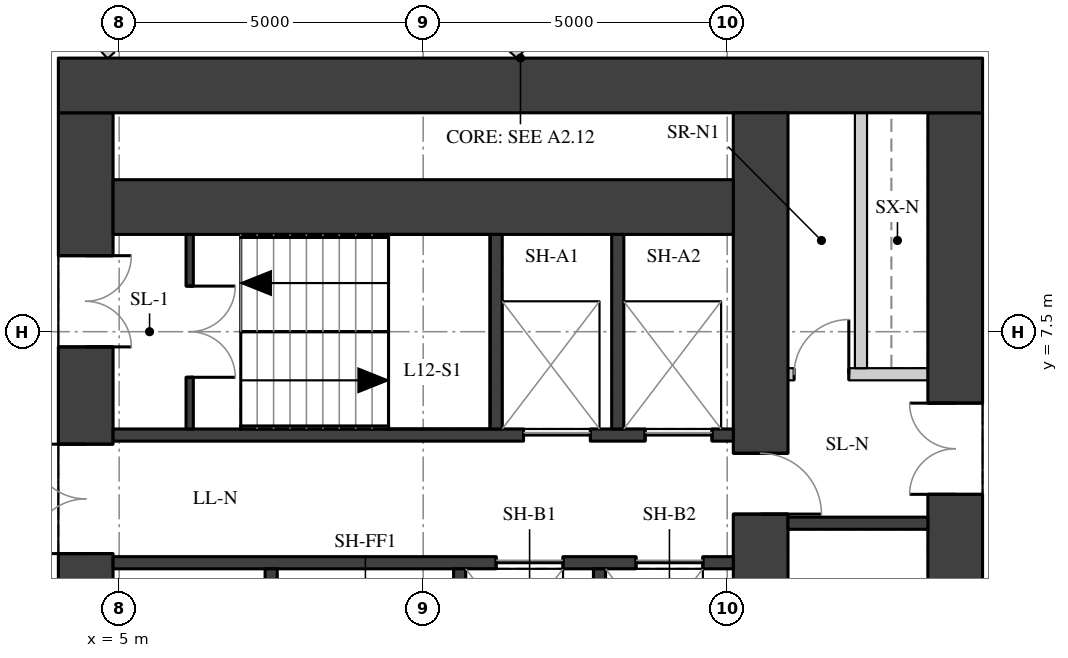
"""IFC4 building model, lengths in metres.
Left out: names, types, materials, properties, quantities, classifications, styles, units other than length and angle.
Written with IfcOpenShell. Run it as: python <this file> out.ifc"""

import sys

from ifc_helpers import new_model, si_unit, direction, frame, frame_2d, origin, place, context, subcontext, project, spatial, rectangle, extrude, element, fill, save


model = new_model("IFC4")
c1 = context("Model", 3, precision=1e-05, world=origin(), true_north=direction((0.0, 1.0)))
c2 = subcontext(c1, "Body", "Model", "MODEL_VIEW")
j1 = project(units=[si_unit("LENGTHUNIT", "METRE"), si_unit("PLANEANGLEUNIT", "RADIAN")], contexts=[c1])
p1 = place(None, origin())
s1 = spatial("IfcSite", under=j1, at=p1, CompositionType="ELEMENT")
p2 = place(p1, origin())
s2 = spatial("IfcBuilding", under=s1, at=p2, CompositionType="ELEMENT")
p3 = place(p2, frame((0.0, 0.0, 48.1)))
s3 = spatial("IfcBuildingStorey", under=s2, at=p3, CompositionType="ELEMENT", Elevation=48.1)
p4 = place(p3, frame((4.45, -11.1, 0.0), z_axis=(0.0, 0.0, 1.0), x_axis=(0.0, 1.0, 0.0)))
e1 = element("IfcWall", 1, at=p4, inside=s3, PredefinedType="SHEAR", context=c2, shape_type="SweptSolid", body=[
    extrude(rectangle(XDim=22.2, YDim=0.9, at=frame_2d((11.1, 0.0))), origin(), (0.0, 0.0, 1.0), 3.02),
])
p5 = place(p4, frame((2.35, 0.0, 0.0)))
e2 = element("IfcOpeningElement", 2, at=p5, cuts=e1, PredefinedType="OPENING", context=c2, shape_type="SweptSolid", body=[
    extrude(rectangle(XDim=1.5, YDim=2.1, at=frame_2d((0.75, 1.05))), frame((0.0, 0.46, 0.0), z_axis=(0.0, -1.0, 0.0), x_axis=(1.0, 0.0, 0.0)), (0.0, 0.0, 1.0), 0.92),
])
p6 = place(p4, frame((5.45, 0.0, 0.0)))
e3 = element("IfcOpeningElement", 3, at=p6, cuts=e1, PredefinedType="OPENING", context=c2, shape_type="SweptSolid", body=[
    extrude(rectangle(XDim=1.8, YDim=2.1, at=frame_2d((0.9, 1.05))), frame((0.0, 0.46, 0.0), z_axis=(0.0, -1.0, 0.0), x_axis=(1.0, 0.0, 0.0)), (0.0, 0.0, 1.0), 0.92),
])
p7 = place(p4, frame((7.95, 0.0, 0.0)))
e4 = element("IfcOpeningElement", 4, at=p7, cuts=e1, PredefinedType="OPENING", context=c2, shape_type="SweptSolid", body=[
    extrude(rectangle(XDim=1.1, YDim=2.1, at=frame_2d((0.55, 1.05))), frame((0.0, 0.46, 0.0), z_axis=(0.0, -1.0, 0.0), x_axis=(1.0, 0.0, 0.0)), (0.0, 0.0, 1.0), 0.92),
])
p8 = place(p4, frame((10.6, 0.0, 0.0)))
e5 = element("IfcOpeningElement", 5, at=p8, cuts=e1, PredefinedType="OPENING", context=c2, shape_type="SweptSolid", body=[
    extrude(rectangle(XDim=1.0, YDim=2.1, at=frame_2d((0.5, 1.05))), frame((0.0, 0.46, 0.0), z_axis=(0.0, -1.0, 0.0), x_axis=(1.0, 0.0, 0.0)), (0.0, 0.0, 1.0), 0.92),
])
p9 = place(p4, frame((13.15, 0.0, 0.0)))
e6 = element("IfcOpeningElement", 6, at=p9, cuts=e1, PredefinedType="OPENING", context=c2, shape_type="SweptSolid", body=[
    extrude(rectangle(XDim=1.1, YDim=2.1, at=frame_2d((0.55, 1.05))), frame((0.0, 0.46, 0.0), z_axis=(0.0, -1.0, 0.0), x_axis=(1.0, 0.0, 0.0)), (0.0, 0.0, 1.0), 0.92),
])
p10 = place(p4, frame((14.95, 0.0, 0.0)))
e7 = element("IfcOpeningElement", 7, at=p10, cuts=e1, PredefinedType="OPENING", context=c2, shape_type="SweptSolid", body=[
    extrude(rectangle(XDim=1.8, YDim=2.1, at=frame_2d((0.9, 1.05))), frame((0.0, 0.46, 0.0), z_axis=(0.0, -1.0, 0.0), x_axis=(1.0, 0.0, 0.0)), (0.0, 0.0, 1.0), 0.92),
])
p11 = place(p4, frame((18.35, 0.0, 0.0)))
e8 = element("IfcOpeningElement", 8, at=p11, cuts=e1, PredefinedType="OPENING", context=c2, shape_type="SweptSolid", body=[
    extrude(rectangle(XDim=1.5, YDim=2.1, at=frame_2d((0.75, 1.05))), frame((0.0, 0.46, 0.0), z_axis=(0.0, -1.0, 0.0), x_axis=(1.0, 0.0, 0.0)), (0.0, 0.0, 1.0), 0.92),
])
p12 = place(p3, frame((18.75, -11.1, 0.0), z_axis=(0.0, 0.0, 1.0), x_axis=(0.0, 1.0, 0.0)))
e9 = element("IfcWall", 9, at=p12, inside=s3, PredefinedType="SHEAR", context=c2, shape_type="SweptSolid", body=[
    extrude(rectangle(XDim=22.2, YDim=0.9, at=frame_2d((11.1, 0.0))), origin(), (0.0, 0.0, 1.0), 3.02),
])
p13 = place(p12, frame((15.925, 0.0, 0.0)))
e10 = element("IfcOpeningElement", 10, at=p13, cuts=e9, PredefinedType="OPENING", context=c2, shape_type="SweptSolid", body=[
    extrude(rectangle(XDim=1.5, YDim=2.1, at=frame_2d((0.75, 1.05))), frame((0.0, 0.46, 0.0), z_axis=(0.0, -1.0, 0.0), x_axis=(1.0, 0.0, 0.0)), (0.0, 0.0, 1.0), 0.92),
])
p14 = place(p12, frame((4.525, 0.0, 0.0)))
e11 = element("IfcOpeningElement", 11, at=p14, cuts=e9, PredefinedType="OPENING", context=c2, shape_type="SweptSolid", body=[
    extrude(rectangle(XDim=1.5, YDim=2.1, at=frame_2d((0.75, 1.05))), frame((0.0, 0.46, 0.0), z_axis=(0.0, -1.0, 0.0), x_axis=(1.0, 0.0, 0.0)), (0.0, 0.0, 1.0), 0.92),
])
p15 = place(p3, frame((4.0, 11.55, 0.0), z_axis=(0.0, 0.0, 1.0), x_axis=(1.0, 0.0, 0.0)))
e12 = element("IfcWall", 12, at=p15, inside=s3, PredefinedType="SHEAR", context=c2, shape_type="SweptSolid", body=[
    extrude(rectangle(XDim=15.2, YDim=0.9, at=frame_2d((7.6, 0.0))), origin(), (0.0, 0.0, 1.0), 3.02),
])
p16 = place(p3, frame((15.55, -11.1, 0.0), z_axis=(0.0, 0.0, 1.0), x_axis=(0.0, 1.0, 0.0)))
e13 = element("IfcWall", 13, at=p16, inside=s3, PredefinedType="SHEAR", context=c2, shape_type="SweptSolid", body=[
    extrude(rectangle(XDim=22.2, YDim=0.9, at=frame_2d((11.1, 0.0))), origin(), (0.0, 0.0, 1.0), 3.02),
])
p17 = place(p16, frame((15.6, 0.0, 0.0)))
e14 = element("IfcOpeningElement", 14, at=p17, cuts=e13, PredefinedType="OPENING", context=c2, shape_type="SweptSolid", body=[
    extrude(rectangle(XDim=1.0, YDim=2.1, at=frame_2d((0.5, 1.05))), frame((0.0, 0.46, 0.0), z_axis=(0.0, -1.0, 0.0), x_axis=(1.0, 0.0, 0.0)), (0.0, 0.0, 1.0), 0.92),
])
p18 = place(p16, frame((5.6, 0.0, 0.0)))
e15 = element("IfcOpeningElement", 15, at=p18, cuts=e13, PredefinedType="OPENING", context=c2, shape_type="SweptSolid", body=[
    extrude(rectangle(XDim=1.0, YDim=2.1, at=frame_2d((0.5, 1.05))), frame((0.0, 0.46, 0.0), z_axis=(0.0, -1.0, 0.0), x_axis=(1.0, 0.0, 0.0)), (0.0, 0.0, 1.0), 0.92),
])
p19 = place(p3, frame((4.9, 9.55, 0.0), z_axis=(0.0, 0.0, 1.0), x_axis=(1.0, 0.0, 0.0)))
e16 = element("IfcWall", 16, at=p19, inside=s3, PredefinedType="SHEAR", context=c2, shape_type="SweptSolid", body=[
    extrude(rectangle(XDim=10.2, YDim=0.9, at=frame_2d((5.1, 0.0))), origin(), (0.0, 0.0, 1.0), 3.02),
])
p20 = place(p3, frame((4.9, 5.8, 0.0), z_axis=(0.0, 0.0, 1.0), x_axis=(1.0, 0.0, 0.0)))
e17 = element("IfcWall", 17, at=p20, inside=s3, PredefinedType="SHEAR", context=c2, shape_type="SweptSolid", body=[
    extrude(rectangle(XDim=10.2, YDim=0.2, at=frame_2d((5.1, 0.0))), origin(), (0.0, 0.0, 1.0), 3.02),
])
p21 = place(p20, frame((6.75, 0.0, 0.0)))
e18 = element("IfcOpeningElement", 18, at=p21, cuts=e17, PredefinedType="OPENING", context=c2, shape_type="SweptSolid", body=[
    extrude(rectangle(XDim=1.1, YDim=2.1, at=frame_2d((0.55, 1.05))), frame((0.0, 0.11, 0.0), z_axis=(0.0, -1.0, 0.0), x_axis=(1.0, 0.0, 0.0)), (0.0, 0.0, 1.0), 0.22),
])
p22 = place(p20, frame((8.75, 0.0, 0.0)))
e19 = element("IfcOpeningElement", 19, at=p22, cuts=e17, PredefinedType="OPENING", context=c2, shape_type="SweptSolid", body=[
    extrude(rectangle(XDim=1.1, YDim=2.1, at=frame_2d((0.55, 1.05))), frame((0.0, 0.11, 0.0), z_axis=(0.0, -1.0, 0.0), x_axis=(1.0, 0.0, 0.0)), (0.0, 0.0, 1.0), 0.22),
])
p23 = place(p3, frame((4.9, 3.7, 0.0), z_axis=(0.0, 0.0, 1.0), x_axis=(1.0, 0.0, 0.0)))
e20 = element("IfcWall", 20, at=p23, inside=s3, PredefinedType="SHEAR", context=c2, shape_type="SweptSolid", body=[
    extrude(rectangle(XDim=10.2, YDim=0.2, at=frame_2d((5.1, 0.0))), origin(), (0.0, 0.0, 1.0), 3.02),
])
p24 = place(p23, frame((6.3, 0.0, 0.0)))
e21 = element("IfcOpeningElement", 21, at=p24, cuts=e20, PredefinedType="OPENING", context=c2, shape_type="SweptSolid", body=[
    extrude(rectangle(XDim=1.1, YDim=2.1, at=frame_2d((0.55, 1.05))), frame((0.0, 0.11, 0.0), z_axis=(0.0, -1.0, 0.0), x_axis=(1.0, 0.0, 0.0)), (0.0, 0.0, 1.0), 0.22),
])
p25 = place(p23, frame((8.6, 0.0, 0.0)))
e22 = element("IfcOpeningElement", 22, at=p25, cuts=e20, PredefinedType="OPENING", context=c2, shape_type="SweptSolid", body=[
    extrude(rectangle(XDim=1.1, YDim=2.1, at=frame_2d((0.55, 1.05))), frame((0.0, 0.11, 0.0), z_axis=(0.0, -1.0, 0.0), x_axis=(1.0, 0.0, 0.0)), (0.0, 0.0, 1.0), 0.22),
])
for number, where, z_axis, x_axis in (
    (23, (11.2, 5.9, 0.0), (0.0, 0.0, 1.0), (0.0, 1.0, 0.0)),
    (24, (13.2, 5.9, 0.0), (0.0, 0.0, 1.0), (0.0, 1.0, 0.0)),
):
    element("IfcWall", number, at=place(p3, frame(where, z_axis=z_axis, x_axis=x_axis)), inside=s3, PredefinedType="SHEAR", context=c2, shape_type="SweptSolid", body=[
        extrude(rectangle(XDim=3.2, YDim=0.2, at=frame_2d((1.6, 0.0))), origin(), (0.0, 0.0, 1.0), 3.02),
    ])
p26 = place(p3, frame((7.5, 1.1, 0.0), z_axis=(0.0, 0.0, 1.0), x_axis=(0.0, 1.0, 0.0)))
e25 = element("IfcWall", 25, at=p26, inside=s3, PredefinedType="SHEAR", context=c2, shape_type="SweptSolid", body=[
    extrude(rectangle(XDim=2.5, YDim=0.2, at=frame_2d((1.25, 0.0))), origin(), (0.0, 0.0, 1.0), 3.02),
])
p27 = place(p26, frame((0.7, 0.0, 0.0)))
e26 = element("IfcOpeningElement", 26, at=p27, cuts=e25, PredefinedType="OPENING", context=c2, shape_type="SweptSolid", body=[
    extrude(rectangle(XDim=1.1, YDim=2.1, at=frame_2d((0.55, 1.05))), frame((0.0, 0.11, 0.0), z_axis=(0.0, -1.0, 0.0), x_axis=(1.0, 0.0, 0.0)), (0.0, 0.0, 1.0), 0.22),
])
for number, where, z_axis, x_axis in (
    (27, (10.6, 1.1, 0.0), (0.0, 0.0, 1.0), (0.0, 1.0, 0.0)),
    (28, (12.9, 1.1, 0.0), (0.0, 0.0, 1.0), (0.0, 1.0, 0.0)),
):
    element("IfcWall", number, at=place(p3, frame(where, z_axis=z_axis, x_axis=x_axis)), inside=s3, PredefinedType="SHEAR", context=c2, shape_type="SweptSolid", body=[
        extrude(rectangle(XDim=2.5, YDim=0.2, at=frame_2d((1.25, 0.0))), origin(), (0.0, 0.0, 1.0), 3.02),
    ])
p28 = place(p3, frame((6.16, 5.9, 0.0), z_axis=(0.0, 0.0, 1.0), x_axis=(0.0, 1.0, 0.0)))
e29 = element("IfcWall", 29, at=p28, inside=s3, PredefinedType="SHEAR", context=c2, shape_type="SweptSolid", body=[
    extrude(rectangle(XDim=3.2, YDim=0.12, at=frame_2d((1.6, 0.0))), origin(), (0.0, 0.0, 1.0), 3.02),
])
p29 = place(p28, frame((0.85, 0.0, 0.0)))
e30 = element("IfcOpeningElement", 30, at=p29, cuts=e29, PredefinedType="OPENING", context=c2, shape_type="SweptSolid", body=[
    extrude(rectangle(XDim=1.5, YDim=2.1, at=frame_2d((0.75, 1.05))), frame((0.0, 0.07, 0.0), z_axis=(0.0, -1.0, 0.0), x_axis=(1.0, 0.0, 0.0)), (0.0, 0.0, 1.0), 0.14),
])
p30 = place(p3, frame((16.0, 4.35, 0.0), z_axis=(0.0, 0.0, 1.0), x_axis=(1.0, 0.0, 0.0)))
e31 = element("IfcWall", 31, at=p30, inside=s3, PredefinedType="SHEAR", context=c2, shape_type="SweptSolid", body=[
    extrude(rectangle(XDim=2.3, YDim=0.2, at=frame_2d((1.15, 0.0))), origin(), (0.0, 0.0, 1.0), 3.02),
])
p31 = place(p3, frame((16.0, 6.8, 0.0), z_axis=(0.0, 0.0, 1.0), x_axis=(1.0, 0.0, 0.0)))
e32 = element("IfcWall", 32, at=p31, inside=s3, PredefinedType="PARTITIONING", context=c2, shape_type="SweptSolid", body=[
    extrude(rectangle(XDim=2.3, YDim=0.2, at=frame_2d((1.15, 0.0))), origin(), (0.0, 0.0, 1.0), 3.02),
])
p32 = place(p31, frame((0.1, 0.0, 0.0)))
e33 = element("IfcOpeningElement", 33, at=p32, cuts=e32, PredefinedType="OPENING", context=c2, shape_type="SweptSolid", body=[
    extrude(rectangle(XDim=0.9, YDim=2.1, at=frame_2d((0.45, 1.05))), frame((0.0, 0.11, 0.0), z_axis=(0.0, -1.0, 0.0), x_axis=(1.0, 0.0, 0.0)), (0.0, 0.0, 1.0), 0.22),
])
p33 = place(p3, frame((17.2, 6.9, 0.0), z_axis=(0.0, 0.0, 1.0), x_axis=(0.0, 1.0, 0.0)))
e34 = element("IfcWall", 34, at=p33, inside=s3, PredefinedType="PARTITIONING", context=c2, shape_type="SweptSolid", body=[
    extrude(rectangle(XDim=4.2, YDim=0.2, at=frame_2d((2.1, 0.0))), origin(), (0.0, 0.0, 1.0), 3.02),
])
p34 = place(p3, frame((4.865, 12.042, 0.0), z_axis=(0.0, 0.0, 1.0), x_axis=(-0.660014599896, 0.751252772323, 0.0)))
e35 = element("IfcWall", 35, at=p34, inside=s3, PredefinedType="PARTITIONING", context=c2, shape_type="SweptSolid", body=[
    extrude(rectangle(XDim=0.835, YDim=0.15, at=frame_2d((0.417, 0.0))), origin(), (0.0, 0.0, 1.0), 2.57),
])
p35 = place(p3, frame((9.901, 13.562, 0.0), z_axis=(0.0, 0.0, 1.0), x_axis=(0.746696753395, -0.665164610054, 0.0)))
e36 = element("IfcWall", 36, at=p35, inside=s3, PredefinedType="PARTITIONING", context=c2, shape_type="SweptSolid", body=[
    extrude(rectangle(XDim=2.27, YDim=0.15, at=frame_2d((1.135, 0.0))), origin(), (0.0, 0.0, 1.0), 3.02),
])
p36 = place(p10, origin())
e37 = element("IfcDoor", 37, at=p36, inside=s3, OperationType="DOUBLE_DOOR_SINGLE_SWING", PredefinedType="DOOR", context=c2, shape_type="SweptSolid", body=[
    extrude(rectangle(XDim=1.8, YDim=2.1, at=frame_2d((0.9, 1.05))), frame((0.0, 0.025, 0.0), z_axis=(0.0, -1.0, 0.0), x_axis=(1.0, 0.0, 0.0)), (0.0, 0.0, 1.0), 0.05),
])
fill(e7, e37)
p37 = place(p11, origin())
e38 = element("IfcDoor", 38, at=p37, inside=s3, OperationType="DOUBLE_DOOR_SINGLE_SWING", PredefinedType="DOOR", context=c2, shape_type="SweptSolid", body=[
    extrude(rectangle(XDim=1.5, YDim=2.1, at=frame_2d((0.75, 1.05))), frame((0.0, 0.025, 0.0), z_axis=(0.0, -1.0, 0.0), x_axis=(1.0, 0.0, 0.0)), (0.0, 0.0, 1.0), 0.05),
])
fill(e8, e38)
p38 = place(p13, origin())
e39 = element("IfcDoor", 39, at=p38, inside=s3, OperationType="DOUBLE_DOOR_SINGLE_SWING", PredefinedType="DOOR", context=c2, shape_type="SweptSolid", body=[
    extrude(rectangle(XDim=1.5, YDim=2.1, at=frame_2d((0.75, 1.05))), frame((0.0, 0.025, 0.0), z_axis=(0.0, -1.0, 0.0), x_axis=(1.0, 0.0, 0.0)), (0.0, 0.0, 1.0), 0.05),
])
fill(e10, e39)
p39 = place(p29, origin())
e40 = element("IfcDoor", 40, at=p39, inside=s3, OperationType="DOUBLE_DOOR_SINGLE_SWING", PredefinedType="DOOR", context=c2, shape_type="SweptSolid", body=[
    extrude(rectangle(XDim=1.5, YDim=2.1, at=frame_2d((0.75, 1.05))), frame((0.0, 0.025, 0.0), z_axis=(0.0, -1.0, 0.0), x_axis=(1.0, 0.0, 0.0)), (0.0, 0.0, 1.0), 0.05),
])
fill(e30, e40)
p40 = place(p21, origin())
e41 = element("IfcDoor", 41, at=p40, inside=s3, OperationType="DOUBLE_DOOR_SLIDING", PredefinedType="DOOR", context=c2, shape_type="SweptSolid", body=[
    extrude(rectangle(XDim=1.1, YDim=2.1, at=frame_2d((0.55, 1.05))), frame((0.0, 0.025, 0.0), z_axis=(0.0, -1.0, 0.0), x_axis=(1.0, 0.0, 0.0)), (0.0, 0.0, 1.0), 0.05),
])
fill(e18, e41)
p41 = place(p22, origin())
e42 = element("IfcDoor", 42, at=p41, inside=s3, OperationType="DOUBLE_DOOR_SLIDING", PredefinedType="DOOR", context=c2, shape_type="SweptSolid", body=[
    extrude(rectangle(XDim=1.1, YDim=2.1, at=frame_2d((0.55, 1.05))), frame((0.0, 0.025, 0.0), z_axis=(0.0, -1.0, 0.0), x_axis=(1.0, 0.0, 0.0)), (0.0, 0.0, 1.0), 0.05),
])
fill(e19, e42)
p42 = place(p24, origin())
e43 = element("IfcDoor", 43, at=p42, inside=s3, OperationType="DOUBLE_DOOR_SLIDING", PredefinedType="DOOR", context=c2, shape_type="SweptSolid", body=[
    extrude(rectangle(XDim=1.1, YDim=2.1, at=frame_2d((0.55, 1.05))), frame((0.0, 0.025, 0.0), z_axis=(0.0, -1.0, 0.0), x_axis=(1.0, 0.0, 0.0)), (0.0, 0.0, 1.0), 0.05),
])
fill(e21, e43)
p43 = place(p25, origin())
e44 = element("IfcDoor", 44, at=p43, inside=s3, OperationType="DOUBLE_DOOR_SLIDING", PredefinedType="DOOR", context=c2, shape_type="SweptSolid", body=[
    extrude(rectangle(XDim=1.1, YDim=2.1, at=frame_2d((0.55, 1.05))), frame((0.0, 0.025, 0.0), z_axis=(0.0, -1.0, 0.0), x_axis=(1.0, 0.0, 0.0)), (0.0, 0.0, 1.0), 0.05),
])
fill(e22, e44)
p44 = place(p17, origin())
e45 = element("IfcDoor", 45, at=p44, inside=s3, OperationType="SINGLE_SWING_RIGHT", PredefinedType="DOOR", context=c2, shape_type="SweptSolid", body=[
    extrude(rectangle(XDim=1.0, YDim=2.1, at=frame_2d((0.5, 1.05))), frame((0.0, 0.025, 0.0), z_axis=(0.0, -1.0, 0.0), x_axis=(1.0, 0.0, 0.0)), (0.0, 0.0, 1.0), 0.05),
])
fill(e14, e45)
p45 = place(p32, origin())
e46 = element("IfcDoor", 46, at=p45, inside=s3, OperationType="SINGLE_SWING_RIGHT", PredefinedType="DOOR", context=c2, shape_type="SweptSolid", body=[
    extrude(rectangle(XDim=0.9, YDim=2.1, at=frame_2d((0.45, 1.05))), frame((0.0, 0.025, 0.0), z_axis=(0.0, -1.0, 0.0), x_axis=(1.0, 0.0, 0.0)), (0.0, 0.0, 1.0), 0.05),
])
fill(e33, e46)
save(model, sys.argv[1])
